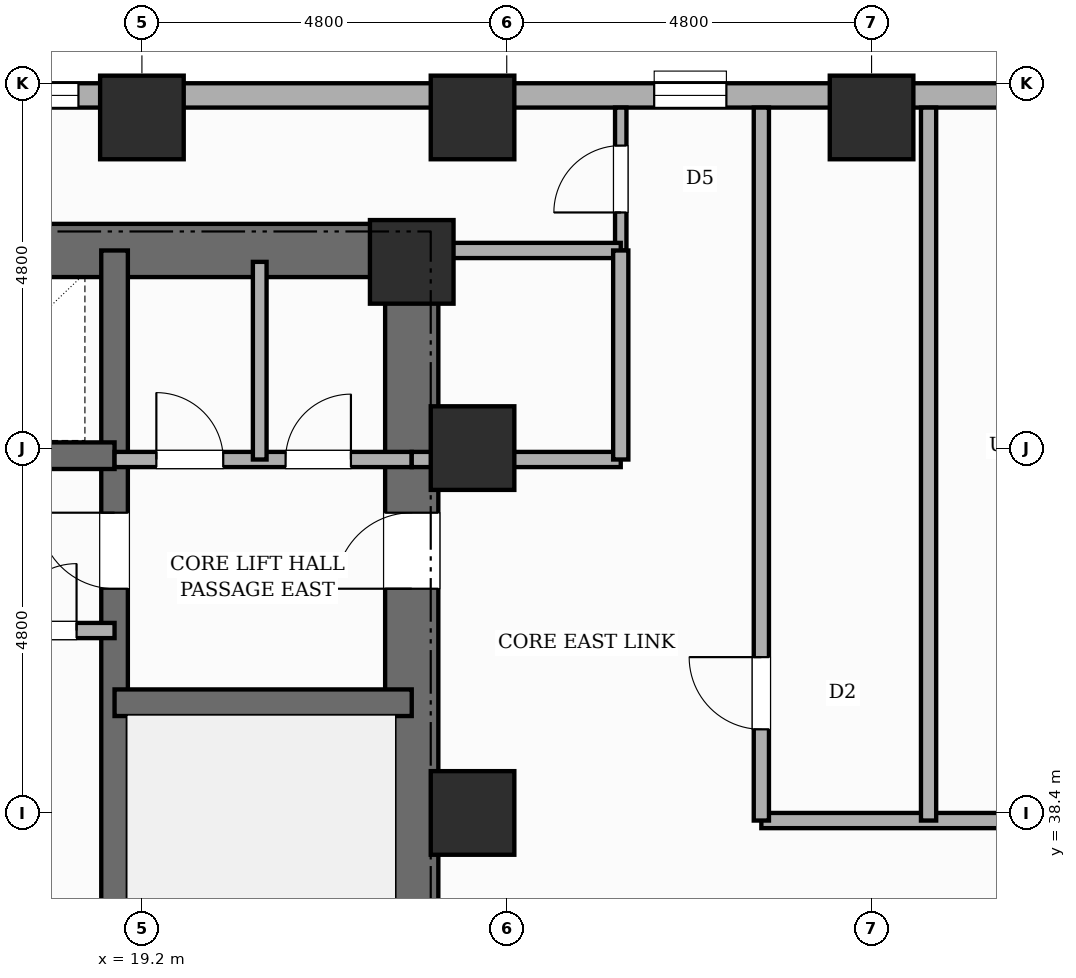
"""IFC4 building model, lengths in metres.
Left out: names, types, materials, properties, quantities, classifications, styles, units other than length and angle.
Written with IfcOpenShell. Run it as: python <this file> out.ifc"""

import sys

from ifc_helpers import new_model, si_unit, direction, frame, frame_2d, origin, origin_2d, place, context, subcontext, project, spatial, rectangle, extrude, element, fill, save


model = new_model("IFC4")
c1 = context("Model", 3, precision=1e-05, world=origin(), true_north=direction((0.0, 1.0)))
c2 = subcontext(c1, "Body", "Model", "MODEL_VIEW")
j1 = project(units=[si_unit("LENGTHUNIT", "METRE"), si_unit("PLANEANGLEUNIT", "RADIAN")], contexts=[c1])
p1 = place(None, origin())
s1 = spatial("IfcSite", under=j1, at=p1, CompositionType="ELEMENT")
p2 = place(p1, origin())
s2 = spatial("IfcBuilding", under=s1, at=p2, CompositionType="ELEMENT")
p3 = place(p2, frame((0.0, 0.0, 46.6)))
s3 = spatial("IfcBuildingStorey", under=s2, at=p3, CompositionType="ELEMENT", Elevation=46.6)
p4 = place(p3, frame((22.75, 30.55, 0.0), z_axis=(0.0, 0.0, 1.0), x_axis=(0.0, 1.0, 0.0)))
e1 = element("IfcWall", 1, at=p4, inside=s3, PredefinedType="SHEAR", context=c2, shape_type="SweptSolid", body=[
    extrude(rectangle(XDim=15.6, YDim=0.7, at=frame_2d((7.8, 0.0))), origin(), (0.0, 0.0, 1.0), 3.6),
])
p5 = place(p4, frame((10.8, 0.0, 0.0)))
e2 = element("IfcOpeningElement", 2, at=p5, cuts=e1, PredefinedType="OPENING", context=c2, shape_type="SweptSolid", body=[
    extrude(rectangle(XDim=1.0, YDim=2.15, at=frame_2d((0.5, 1.075))), frame((0.0, 0.36, 0.0), z_axis=(0.0, -1.0, 0.0), x_axis=(1.0, 0.0, 0.0)), (0.0, 0.0, 1.0), 0.72),
])
p6 = place(p3, frame((6.05, 45.8, 0.0), z_axis=(0.0, 0.0, 1.0), x_axis=(1.0, 0.0, 0.0)))
e3 = element("IfcWall", 3, at=p6, inside=s3, PredefinedType="SHEAR", context=c2, shape_type="SweptSolid", body=[
    extrude(rectangle(XDim=16.7, YDim=0.7, at=frame_2d((8.35, 0.0))), origin(), (0.0, 0.0, 1.0), 3.6),
])
p7 = place(p3, frame((18.84, 30.9, 0.0), z_axis=(0.0, 0.0, 1.0), x_axis=(0.0, 1.0, 0.0)))
e4 = element("IfcWall", 4, at=p7, inside=s3, PredefinedType="SHEAR", context=c2, shape_type="SweptSolid", body=[
    extrude(rectangle(XDim=14.9, YDim=0.35, at=frame_2d((7.45, 0.0))), origin(), (0.0, 0.0, 1.0), 3.6),
])
p8 = place(p7, frame((0.65, 0.0, 0.0)))
e5 = element("IfcOpeningElement", 5, at=p8, cuts=e4, PredefinedType="OPENING", context=c2, shape_type="SweptSolid", body=[
    extrude(rectangle(XDim=0.95, YDim=2.1, at=frame_2d((0.475, 1.05))), frame((0.0, 0.185, 0.0), z_axis=(0.0, -1.0, 0.0), x_axis=(1.0, 0.0, 0.0)), (0.0, 0.0, 1.0), 0.37),
])
p9 = place(p7, frame((10.45, 0.0, 0.0)))
e6 = element("IfcOpeningElement", 6, at=p9, cuts=e4, PredefinedType="OPENING", context=c2, shape_type="SweptSolid", body=[
    extrude(rectangle(XDim=1.0, YDim=2.15, at=frame_2d((0.5, 1.075))), frame((0.0, 0.185, 0.0), z_axis=(0.0, -1.0, 0.0), x_axis=(1.0, 0.0, 0.0)), (0.0, 0.0, 1.0), 0.37),
])
p10 = place(p3, frame((18.84, 39.85, 0.0), z_axis=(0.0, 0.0, 1.0), x_axis=(1.0, 0.0, 0.0)))
e7 = element("IfcWall", 7, at=p10, inside=s3, PredefinedType="SHEAR", context=c2, shape_type="SweptSolid", body=[
    extrude(rectangle(XDim=3.91, YDim=0.35, at=frame_2d((1.955, 0.0))), origin(), (0.0, 0.0, 1.0), 3.6),
])
p11 = place(p3, frame((9.96, 43.1, 0.0), z_axis=(0.0, 0.0, 1.0), x_axis=(1.0, 0.0, 0.0)))
e8 = element("IfcWall", 8, at=p11, inside=s3, PredefinedType="SHEAR", context=c2, shape_type="SweptSolid", body=[
    extrude(rectangle(XDim=8.88, YDim=0.35, at=frame_2d((4.44, 0.0))), origin(), (0.0, 0.0, 1.0), 3.6),
])
for number, where, z_axis, x_axis in (
    (9, (19.2, 47.55, 0.0), (0.0, 0.0, 1.0), (1.0, 0.0, 0.0)),
    (10, (22.75, 45.65, 0.0), (0.0, 0.0, 1.0), (1.0, 0.0, 0.0)),
    (11, (23.55, 38.4, 0.0), (0.0, 0.0, 1.0), (1.0, 0.0, 0.0)),
    (12, (23.55, 43.2, 0.0), (0.0, 0.0, 1.0), (1.0, 0.0, 0.0)),
    (13, (23.55, 47.55, 0.0), (0.0, 0.0, 1.0), (1.0, 0.0, 0.0)),
    (14, (28.8, 47.55, 0.0), (0.0, 0.0, 1.0), (1.0, 0.0, 0.0)),
):
    element("IfcColumn", number, at=place(p3, frame(where, z_axis=z_axis, x_axis=x_axis)), inside=s3, PredefinedType="COLUMN", context=c2, shape_type="SweptSolid", body=[
        extrude(rectangle(XDim=1.1, YDim=1.1, at=origin_2d()), origin(), (0.0, 0.0, 1.0), 3.6),
    ])
p12 = place(p3, frame((7.2, 47.84, 0.0), z_axis=(0.0, 0.0, 1.0), x_axis=(1.0, 0.0, 0.0)))
e15 = element("IfcWall", 15, at=p12, inside=s3, PredefinedType="STANDARD", context=c2, shape_type="SweptSolid", body=[
    extrude(rectangle(XDim=48.0, YDim=0.32, at=frame_2d((24.0, 0.0))), origin(), (0.0, 0.0, 1.0), 2.53),
])
p13 = place(p12, frame((28.803, 0.0, 0.65)))
e16 = element("IfcOpeningElement", 16, at=p13, cuts=e15, PredefinedType="OPENING", context=c2, shape_type="SweptSolid", body=[
    extrude(rectangle(XDim=1.4, YDim=1.1, at=frame_2d((0.7, 0.55))), frame((0.0, 0.17, 0.0), z_axis=(0.0, -1.0, 0.0), x_axis=(1.0, 0.0, 0.0)), (0.0, 0.0, 1.0), 0.34),
])
p14 = place(p12, frame((47.094, 0.0, 0.45)))
e17 = element("IfcOpeningElement", 17, at=p14, cuts=e15, PredefinedType="OPENING", context=c2, shape_type="SweptSolid", body=[
    extrude(rectangle(XDim=0.6, YDim=1.8, at=frame_2d((0.3, 0.9))), frame((0.0, 0.17, 0.0), z_axis=(0.0, -1.0, 0.0), x_axis=(1.0, 0.0, 0.0)), (0.0, 0.0, 1.0), 0.34),
])
p15 = place(p12, frame((18.74, 0.0, 0.45)))
e18 = element("IfcOpeningElement", 18, at=p15, cuts=e15, PredefinedType="OPENING", context=c2, shape_type="SweptSolid", body=[
    extrude(rectangle(XDim=0.95, YDim=1.8, at=frame_2d((0.475, 0.9))), frame((0.0, 0.17, 0.0), z_axis=(0.0, -1.0, 0.0), x_axis=(1.0, 0.0, 0.0)), (0.0, 0.0, 1.0), 0.34),
])
p16 = place(p12, frame((41.65, 0.0, 0.45)))
e19 = element("IfcOpeningElement", 19, at=p16, cuts=e15, PredefinedType="OPENING", context=c2, shape_type="SweptSolid", body=[
    extrude(rectangle(XDim=0.75, YDim=1.8, at=frame_2d((0.375, 0.9))), frame((0.0, 0.17, 0.0), z_axis=(0.0, -1.0, 0.0), x_axis=(1.0, 0.0, 0.0)), (0.0, 0.0, 1.0), 0.34),
])
p17 = place(p12, frame((37.736, 0.0, 0.65)))
e20 = element("IfcOpeningElement", 20, at=p17, cuts=e15, PredefinedType="OPENING", context=c2, shape_type="SweptSolid", body=[
    extrude(rectangle(XDim=1.4, YDim=1.1, at=frame_2d((0.7, 0.55))), frame((0.0, 0.17, 0.0), z_axis=(0.0, -1.0, 0.0), x_axis=(1.0, 0.0, 0.0)), (0.0, 0.0, 1.0), 0.34),
])
p18 = place(p12, frame((0.47, 0.0, 0.45)))
e21 = element("IfcOpeningElement", 21, at=p18, cuts=e15, PredefinedType="OPENING", context=c2, shape_type="SweptSolid", body=[
    extrude(rectangle(XDim=0.95, YDim=1.8, at=frame_2d((0.475, 0.9))), frame((0.0, 0.17, 0.0), z_axis=(0.0, -1.0, 0.0), x_axis=(1.0, 0.0, 0.0)), (0.0, 0.0, 1.0), 0.34),
])
p19 = place(p12, frame((10.215, 0.0, 0.45)))
e22 = element("IfcOpeningElement", 22, at=p19, cuts=e15, PredefinedType="OPENING", context=c2, shape_type="SweptSolid", body=[
    extrude(rectangle(XDim=0.95, YDim=1.8, at=frame_2d((0.475, 0.9))), frame((0.0, 0.17, 0.0), z_axis=(0.0, -1.0, 0.0), x_axis=(1.0, 0.0, 0.0)), (0.0, 0.0, 1.0), 0.34),
])
p20 = place(p12, frame((23.43, 0.0, 0.65)))
e23 = element("IfcOpeningElement", 23, at=p20, cuts=e15, PredefinedType="OPENING", context=c2, shape_type="SweptSolid", body=[
    extrude(rectangle(XDim=1.4, YDim=1.1, at=frame_2d((0.7, 0.55))), frame((0.0, 0.17, 0.0), z_axis=(0.0, -1.0, 0.0), x_axis=(1.0, 0.0, 0.0)), (0.0, 0.0, 1.0), 0.34),
])
p21 = place(p12, frame((42.95, 0.0, 0.65)))
e24 = element("IfcOpeningElement", 24, at=p21, cuts=e15, PredefinedType="OPENING", context=c2, shape_type="SweptSolid", body=[
    extrude(rectangle(XDim=1.4, YDim=1.1, at=frame_2d((0.7, 0.55))), frame((0.0, 0.17, 0.0), z_axis=(0.0, -1.0, 0.0), x_axis=(1.0, 0.0, 0.0)), (0.0, 0.0, 1.0), 0.34),
])
p22 = place(p12, frame((45.984, 0.0, 0.45)))
e25 = element("IfcOpeningElement", 25, at=p22, cuts=e15, PredefinedType="OPENING", context=c2, shape_type="SweptSolid", body=[
    extrude(rectangle(XDim=0.6, YDim=1.8, at=frame_2d((0.3, 0.9))), frame((0.0, 0.17, 0.0), z_axis=(0.0, -1.0, 0.0), x_axis=(1.0, 0.0, 0.0)), (0.0, 0.0, 1.0), 0.34),
])
p23 = place(p3, frame((9.96, 40.8, 0.0), z_axis=(0.0, 0.0, 1.0), x_axis=(1.0, 0.0, 0.0)))
e26 = element("IfcWall", 26, at=p23, inside=s3, PredefinedType="POLYGONAL", context=c2, shape_type="SweptSolid", body=[
    extrude(rectangle(XDim=8.88, YDim=0.2, at=frame_2d((4.44, 0.0))), origin(), (0.0, 0.0, 1.0), 3.35),
])
p24 = place(p23, frame((7.5, 0.0, 0.0)))
e27 = element("IfcOpeningElement", 27, at=p24, cuts=e26, PredefinedType="OPENING", context=c2, shape_type="SweptSolid", body=[
    extrude(rectangle(XDim=0.88, YDim=2.1, at=frame_2d((0.44, 1.05))), frame((0.0, 0.11, 0.0), z_axis=(0.0, -1.0, 0.0), x_axis=(1.0, 0.0, 0.0)), (0.0, 0.0, 1.0), 0.22),
])
p25 = place(p23, frame((3.6, 0.0, 0.0)))
e28 = element("IfcOpeningElement", 28, at=p25, cuts=e26, PredefinedType="OPENING", context=c2, shape_type="SweptSolid", body=[
    extrude(rectangle(XDim=0.88, YDim=2.1, at=frame_2d((0.44, 1.05))), frame((0.0, 0.11, 0.0), z_axis=(0.0, -1.0, 0.0), x_axis=(1.0, 0.0, 0.0)), (0.0, 0.0, 1.0), 0.22),
])
p26 = place(p3, frame((18.84, 43.05, 0.0), z_axis=(0.0, 0.0, 1.0), x_axis=(1.0, 0.0, 0.0)))
e29 = element("IfcWall", 29, at=p26, inside=s3, PredefinedType="POLYGONAL", context=c2, shape_type="SweptSolid", body=[
    extrude(rectangle(XDim=3.91, YDim=0.2, at=frame_2d((1.955, 0.0))), origin(), (0.0, 0.0, 1.0), 2.53),
])
p27 = place(p26, frame((0.55, 0.0, 0.0)))
e30 = element("IfcOpeningElement", 30, at=p27, cuts=e29, PredefinedType="OPENING", context=c2, shape_type="SweptSolid", body=[
    extrude(rectangle(XDim=0.88, YDim=2.1, at=frame_2d((0.44, 1.05))), frame((0.0, 0.11, 0.0), z_axis=(0.0, -1.0, 0.0), x_axis=(1.0, 0.0, 0.0)), (0.0, 0.0, 1.0), 0.22),
])
p28 = place(p26, frame((2.25, 0.0, 0.0)))
e31 = element("IfcOpeningElement", 31, at=p28, cuts=e29, PredefinedType="OPENING", context=c2, shape_type="SweptSolid", body=[
    extrude(rectangle(XDim=0.86, YDim=2.1, at=frame_2d((0.43, 1.05))), frame((0.0, 0.11, 0.0), z_axis=(0.0, -1.0, 0.0), x_axis=(1.0, 0.0, 0.0)), (0.0, 0.0, 1.0), 0.22),
])
p29 = place(p3, frame((20.75, 43.05, 0.0), z_axis=(0.0, 0.0, 1.0), x_axis=(0.0, 1.0, 0.0)))
e32 = element("IfcWall", 32, at=p29, inside=s3, PredefinedType="PLUMBINGWALL", context=c2, shape_type="SweptSolid", body=[
    extrude(rectangle(XDim=2.6, YDim=0.18, at=frame_2d((1.3, 0.0))), origin(), (0.0, 0.0, 1.0), 3.35),
])
p30 = place(p3, frame((25.5, 45.8, 0.0), z_axis=(0.0, 0.0, 1.0), x_axis=(0.0, 1.0, 0.0)))
e33 = element("IfcWall", 33, at=p30, inside=s3, PredefinedType="PARTITIONING", context=c2, shape_type="SweptSolid", body=[
    extrude(rectangle(XDim=1.88, YDim=0.15, at=frame_2d((0.94, 0.0))), origin(), (0.0, 0.0, 1.0), 3.35),
])
p31 = place(p30, frame((0.5, 0.0, 0.0)))
e34 = element("IfcOpeningElement", 34, at=p31, cuts=e33, PredefinedType="OPENING", context=c2, shape_type="SweptSolid", body=[
    extrude(rectangle(XDim=0.88, YDim=2.1, at=frame_2d((0.44, 1.05))), frame((0.0, 0.085, 0.0), z_axis=(0.0, -1.0, 0.0), x_axis=(1.0, 0.0, 0.0)), (0.0, 0.0, 1.0), 0.17),
])
p32 = place(p3, frame((22.75, 45.8, 0.0), z_axis=(0.0, 0.0, 1.0), x_axis=(1.0, 0.0, 0.0)))
e35 = element("IfcWall", 35, at=p32, inside=s3, PredefinedType="PARTITIONING", context=c2, shape_type="SweptSolid", body=[
    extrude(rectangle(XDim=2.75, YDim=0.2, at=frame_2d((1.375, 0.0))), origin(), (0.0, 0.0, 1.0), 3.35),
])
p33 = place(p3, frame((27.35, 38.3, 0.0), z_axis=(0.0, 0.0, 1.0), x_axis=(1.0, 0.0, 0.0)))
e36 = element("IfcWall", 36, at=p33, inside=s3, PredefinedType="PARTITIONING", context=c2, shape_type="SweptSolid", body=[
    extrude(rectangle(XDim=14.43, YDim=0.2, at=frame_2d((7.215, 0.0))), origin(), (0.0, 0.0, 1.0), 3.35),
])
p34 = place(p33, frame((4.803, 0.0, 0.0)))
e37 = element("IfcOpeningElement", 37, at=p34, cuts=e36, PredefinedType="OPENING", context=c2, shape_type="SweptSolid", body=[
    extrude(rectangle(XDim=0.98, YDim=2.18, at=frame_2d((0.49, 1.09))), frame((0.0, 0.11, 0.0), z_axis=(0.0, -1.0, 0.0), x_axis=(1.0, 0.0, 0.0)), (0.0, 0.0, 1.0), 0.22),
])
p35 = place(p3, frame((27.35, 38.3, 0.0), z_axis=(0.0, 0.0, 1.0), x_axis=(0.0, 1.0, 0.0)))
e38 = element("IfcWall", 38, at=p35, inside=s3, PredefinedType="PARTITIONING", context=c2, shape_type="SweptSolid", body=[
    extrude(rectangle(XDim=9.38, YDim=0.2, at=frame_2d((4.69, 0.0))), origin(), (0.0, 0.0, 1.0), 3.35),
])
p36 = place(p35, frame((1.2, 0.0, 0.0)))
e39 = element("IfcOpeningElement", 39, at=p36, cuts=e38, PredefinedType="OPENING", context=c2, shape_type="SweptSolid", body=[
    extrude(rectangle(XDim=0.95, YDim=2.15, at=frame_2d((0.475, 1.075))), frame((0.0, 0.11, 0.0), z_axis=(0.0, -1.0, 0.0), x_axis=(1.0, 0.0, 0.0)), (0.0, 0.0, 1.0), 0.22),
])
p37 = place(p3, frame((22.75, 43.05, 0.0), z_axis=(0.0, 0.0, 1.0), x_axis=(1.0, 0.0, 0.0)))
e40 = element("IfcWall", 40, at=p37, inside=s3, PredefinedType="PARTITIONING", context=c2, shape_type="SweptSolid", body=[
    extrude(rectangle(XDim=2.75, YDim=0.2, at=frame_2d((1.375, 0.0))), origin(), (0.0, 0.0, 1.0), 2.53),
])
p38 = place(p3, frame((25.5, 43.05, 0.0), z_axis=(0.0, 0.0, 1.0), x_axis=(0.0, 1.0, 0.0)))
e41 = element("IfcWall", 41, at=p38, inside=s3, PredefinedType="PARTITIONING", context=c2, shape_type="SweptSolid", body=[
    extrude(rectangle(XDim=2.75, YDim=0.2, at=frame_2d((1.375, 0.0))), origin(), (0.0, 0.0, 1.0), 3.35),
])
p39 = place(p3, frame((29.55, 38.3, 0.0), z_axis=(0.0, 0.0, 1.0), x_axis=(0.0, 1.0, 0.0)))
e42 = element("IfcWall", 42, at=p39, inside=s3, PredefinedType="SOLIDWALL", context=c2, shape_type="SweptSolid", body=[
    extrude(rectangle(XDim=9.38, YDim=0.2, at=frame_2d((4.69, 0.0))), origin(), (0.0, 0.0, 1.0), 3.35),
])
p40 = place(p15, origin())
e43 = element("IfcWindow", 43, at=p40, inside=s3, PartitioningType="SINGLE_PANEL", PredefinedType="WINDOW", context=c2, shape_type="SweptSolid", body=[
    extrude(rectangle(XDim=0.95, YDim=1.8, at=frame_2d((0.475, 0.9))), frame((0.0, 0.03, 0.0), z_axis=(0.0, -1.0, 0.0), x_axis=(1.0, 0.0, 0.0)), (0.0, 0.0, 1.0), 0.06),
])
fill(e18, e43)
p41 = place(p19, origin())
e44 = element("IfcWindow", 44, at=p41, inside=s3, PartitioningType="SINGLE_PANEL", PredefinedType="WINDOW", context=c2, shape_type="SweptSolid", body=[
    extrude(rectangle(XDim=0.95, YDim=1.8, at=frame_2d((0.475, 0.9))), frame((0.0, 0.03, 0.0), z_axis=(0.0, -1.0, 0.0), x_axis=(1.0, 0.0, 0.0)), (0.0, 0.0, 1.0), 0.06),
])
fill(e22, e44)
p42 = place(p24, origin())
e45 = element("IfcDoor", 45, at=p42, inside=s3, OperationType="SINGLE_SWING_RIGHT", PredefinedType="DOOR", context=c2, shape_type="SweptSolid", body=[
    extrude(rectangle(XDim=0.88, YDim=2.1, at=frame_2d((0.44, 1.05))), frame((0.0, 0.025, 0.0), z_axis=(0.0, -1.0, 0.0), x_axis=(1.0, 0.0, 0.0)), (0.0, 0.0, 1.0), 0.05),
])
fill(e27, e45)
p43 = place(p9, origin())
e46 = element("IfcDoor", 46, at=p43, inside=s3, OperationType="SINGLE_SWING_RIGHT", PredefinedType="DOOR", context=c2, shape_type="SweptSolid", body=[
    extrude(rectangle(XDim=1.0, YDim=2.15, at=frame_2d((0.5, 1.075))), frame((0.0, 0.025, 0.0), z_axis=(0.0, -1.0, 0.0), x_axis=(1.0, 0.0, 0.0)), (0.0, 0.0, 1.0), 0.05),
])
fill(e6, e46)
p44 = place(p5, origin())
e47 = element("IfcDoor", 47, at=p44, inside=s3, OperationType="SINGLE_SWING_LEFT", PredefinedType="DOOR", context=c2, shape_type="SweptSolid", body=[
    extrude(rectangle(XDim=1.0, YDim=2.15, at=frame_2d((0.5, 1.075))), frame((0.0, 0.025, 0.0), z_axis=(0.0, -1.0, 0.0), x_axis=(1.0, 0.0, 0.0)), (0.0, 0.0, 1.0), 0.05),
])
fill(e2, e47)
p45 = place(p27, origin())
e48 = element("IfcDoor", 48, at=p45, inside=s3, OperationType="SINGLE_SWING_LEFT", PredefinedType="DOOR", context=c2, shape_type="SweptSolid", body=[
    extrude(rectangle(XDim=0.88, YDim=2.1, at=frame_2d((0.44, 1.05))), frame((0.0, 0.025, 0.0), z_axis=(0.0, -1.0, 0.0), x_axis=(1.0, 0.0, 0.0)), (0.0, 0.0, 1.0), 0.05),
])
fill(e30, e48)
p46 = place(p28, origin())
e49 = element("IfcDoor", 49, at=p46, inside=s3, OperationType="SINGLE_SWING_RIGHT", PredefinedType="DOOR", context=c2, shape_type="SweptSolid", body=[
    extrude(rectangle(XDim=0.86, YDim=2.1, at=frame_2d((0.43, 1.05))), frame((0.0, 0.025, 0.0), z_axis=(0.0, -1.0, 0.0), x_axis=(1.0, 0.0, 0.0)), (0.0, 0.0, 1.0), 0.05),
])
fill(e31, e49)
p47 = place(p31, origin())
e50 = element("IfcDoor", 50, at=p47, inside=s3, OperationType="SINGLE_SWING_LEFT", PredefinedType="DOOR", context=c2, shape_type="SweptSolid", body=[
    extrude(rectangle(XDim=0.88, YDim=2.1, at=frame_2d((0.44, 1.05))), frame((0.0, 0.025, 0.0), z_axis=(0.0, -1.0, 0.0), x_axis=(1.0, 0.0, 0.0)), (0.0, 0.0, 1.0), 0.05),
])
fill(e34, e50)
p48 = place(p36, origin())
e51 = element("IfcDoor", 51, at=p48, inside=s3, OperationType="SINGLE_SWING_RIGHT", PredefinedType="DOOR", context=c2, shape_type="SweptSolid", body=[
    extrude(rectangle(XDim=0.95, YDim=2.15, at=frame_2d((0.475, 1.075))), frame((0.0, 0.025, 0.0), z_axis=(0.0, -1.0, 0.0), x_axis=(1.0, 0.0, 0.0)), (0.0, 0.0, 1.0), 0.05),
])
fill(e39, e51)
save(model, sys.argv[1])
